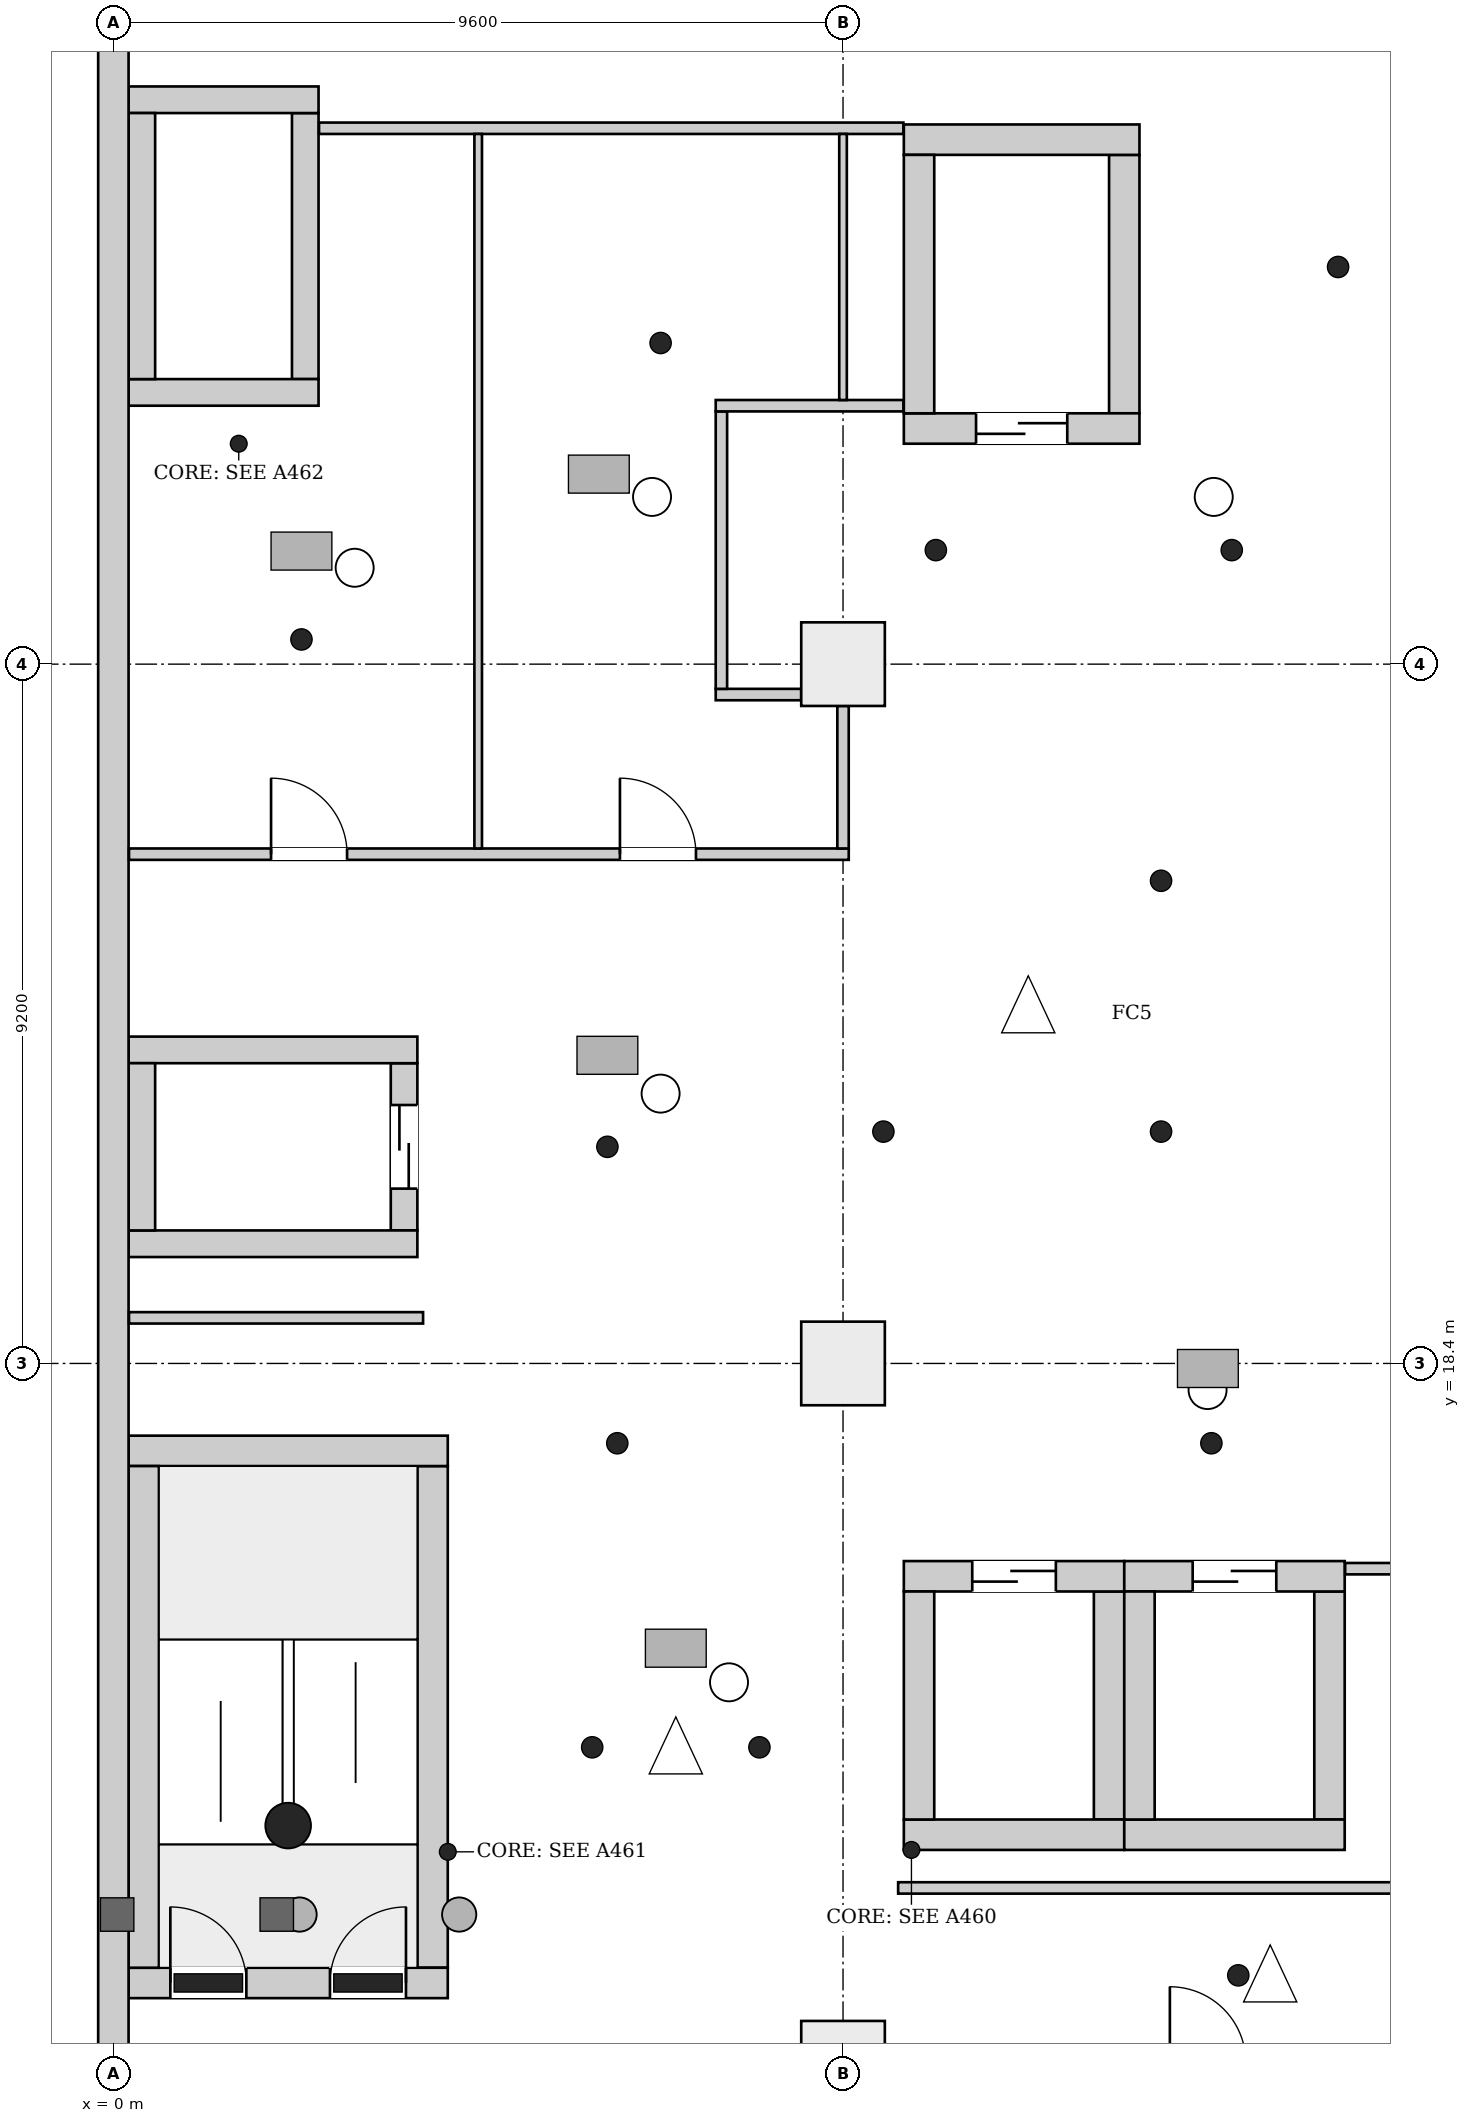
"""IFC4 building model, lengths in metres.
Left out: names, types, materials, properties, quantities, classifications, styles, units other than length and angle.
Written with IfcOpenShell. Run it as: python <this file> out.ifc"""

import sys

from ifc_helpers import new_model, si_unit, direction, frame, frame_2d, origin, origin_2d, place, context, subcontext, project, spatial, rectangle, extrude, element, fill, save


model = new_model("IFC4")
c1 = context("Model", 3, precision=1e-05, world=origin(), true_north=direction((0.0, 1.0)))
c2 = subcontext(c1, "Body", "Model", "MODEL_VIEW")
j1 = project(units=[si_unit("LENGTHUNIT", "METRE"), si_unit("PLANEANGLEUNIT", "RADIAN")], contexts=[c1])
p1 = place(None, origin())
s1 = spatial("IfcSite", under=j1, at=p1, CompositionType="ELEMENT")
p2 = place(p1, origin())
s2 = spatial("IfcBuilding", under=s1, at=p2, CompositionType="ELEMENT")
p3 = place(p2, frame((0.0, 0.0, 26.7)))
s3 = spatial("IfcBuildingStorey", under=s2, at=p3, CompositionType="ELEMENT", Elevation=26.7)
p4 = place(p3, frame((0.0, -0.2, 0.0), z_axis=(0.0, 0.0, 1.0), x_axis=(0.0, 1.0, 0.0)))
e1 = element("IfcWall", 1, at=p4, inside=s3, PredefinedType="SHEAR", context=c2, shape_type="SweptSolid", body=[
    extrude(rectangle(XDim=46.88, YDim=0.4, at=frame_2d((23.44, 0.0))), origin(), (0.0, 0.0, 1.0), 5.2),
])
p5 = place(p3, frame((0.2, 10.25, 0.0), z_axis=(0.0, 0.0, 1.0), x_axis=(1.0, 0.0, 0.0)))
e2 = element("IfcWall", 2, at=p5, inside=s3, PredefinedType="SHEAR", context=c2, shape_type="SweptSolid", body=[
    extrude(rectangle(XDim=4.2, YDim=0.4, at=frame_2d((2.1, 0.0))), origin(), (0.0, 0.0, 1.0), 5.2),
])
p6 = place(p5, frame((0.55, 0.0, 0.0)))
e3 = element("IfcOpeningElement", 3, at=p6, cuts=e2, PredefinedType="OPENING", context=c2, shape_type="SweptSolid", body=[
    extrude(rectangle(XDim=1.0, YDim=2.1, at=frame_2d((0.5, 1.05))), frame((0.0, 0.21, 0.0), z_axis=(0.0, -1.0, 0.0), x_axis=(1.0, 0.0, 0.0)), (0.0, 0.0, 1.0), 0.42),
])
p7 = place(p5, frame((2.65, 0.0, 0.0)))
e4 = element("IfcOpeningElement", 4, at=p7, cuts=e2, PredefinedType="OPENING", context=c2, shape_type="SweptSolid", body=[
    extrude(rectangle(XDim=1.0, YDim=2.1, at=frame_2d((0.5, 1.05))), frame((0.0, 0.21, 0.0), z_axis=(0.0, -1.0, 0.0), x_axis=(1.0, 0.0, 0.0)), (0.0, 0.0, 1.0), 0.42),
])
p8 = place(p3, frame((0.2, 17.25, 0.0), z_axis=(0.0, 0.0, 1.0), x_axis=(1.0, 0.0, 0.0)))
e5 = element("IfcWall", 5, at=p8, inside=s3, PredefinedType="SHEAR", context=c2, shape_type="SweptSolid", body=[
    extrude(rectangle(XDim=4.2, YDim=0.4, at=frame_2d((2.1, 0.0))), origin(), (0.0, 0.0, 1.0), 5.2),
])
for number, where, z_axis, x_axis in (
    (6, (0.4, 10.45, 0.0), (0.0, 0.0, 1.0), (0.0, 1.0, 0.0)),
    (7, (4.2, 10.45, 0.0), (0.0, 0.0, 1.0), (0.0, 1.0, 0.0)),
):
    element("IfcWall", number, at=place(p3, frame(where, z_axis=z_axis, x_axis=x_axis)), inside=s3, PredefinedType="SHEAR", context=c2, shape_type="SweptSolid", body=[
        extrude(rectangle(XDim=6.6, YDim=0.4, at=frame_2d((3.3, 0.0))), origin(), (0.0, 0.0, 1.0), 5.2),
    ])
for number, where, z_axis, x_axis in (
    (8, (0.2, 19.975, 0.0), (0.0, 0.0, 1.0), (1.0, 0.0, 0.0)),
    (9, (0.2, 22.525, 0.0), (0.0, 0.0, 1.0), (1.0, 0.0, 0.0)),
):
    element("IfcWall", number, at=place(p3, frame(where, z_axis=z_axis, x_axis=x_axis)), inside=s3, PredefinedType="SHEAR", context=c2, shape_type="SweptSolid", body=[
        extrude(rectangle(XDim=3.8, YDim=0.35, at=frame_2d((1.9, 0.0))), origin(), (0.0, 0.0, 1.0), 5.2),
    ])
p9 = place(p3, frame((0.375, 20.15, 0.0), z_axis=(0.0, 0.0, 1.0), x_axis=(0.0, 1.0, 0.0)))
e10 = element("IfcWall", 10, at=p9, inside=s3, PredefinedType="SHEAR", context=c2, shape_type="SweptSolid", body=[
    extrude(rectangle(XDim=2.2, YDim=0.35, at=frame_2d((1.1, 0.0))), origin(), (0.0, 0.0, 1.0), 5.2),
])
p10 = place(p3, frame((3.825, 20.15, 0.0), z_axis=(0.0, 0.0, 1.0), x_axis=(0.0, 1.0, 0.0)))
e11 = element("IfcWall", 11, at=p10, inside=s3, PredefinedType="SHEAR", context=c2, shape_type="SweptSolid", body=[
    extrude(rectangle(XDim=2.2, YDim=0.35, at=frame_2d((1.1, 0.0))), origin(), (0.0, 0.0, 1.0), 5.2),
])
p11 = place(p10, frame((0.55, 0.0, 0.0)))
e12 = element("IfcOpeningElement", 12, at=p11, cuts=e11, PredefinedType="OPENING", context=c2, shape_type="SweptSolid", body=[
    extrude(rectangle(XDim=1.1, YDim=2.1, at=frame_2d((0.55, 1.05))), frame((0.0, 0.185, 0.0), z_axis=(0.0, -1.0, 0.0), x_axis=(1.0, 0.0, 0.0)), (0.0, 0.0, 1.0), 0.37),
])
for number, where, z_axis, x_axis in (
    (13, (0.2, 31.175, 0.0), (0.0, 0.0, 1.0), (1.0, 0.0, 0.0)),
    (14, (0.2, 35.025, 0.0), (0.0, 0.0, 1.0), (1.0, 0.0, 0.0)),
):
    element("IfcWall", number, at=place(p3, frame(where, z_axis=z_axis, x_axis=x_axis)), inside=s3, PredefinedType="SHEAR", context=c2, shape_type="SweptSolid", body=[
        extrude(rectangle(XDim=2.5, YDim=0.35, at=frame_2d((1.25, 0.0))), origin(), (0.0, 0.0, 1.0), 5.2),
    ])
for number, where, z_axis, x_axis in (
    (15, (0.375, 31.35, 0.0), (0.0, 0.0, 1.0), (0.0, 1.0, 0.0)),
    (16, (2.525, 31.35, 0.0), (0.0, 0.0, 1.0), (0.0, 1.0, 0.0)),
):
    element("IfcWall", number, at=place(p3, frame(where, z_axis=z_axis, x_axis=x_axis)), inside=s3, PredefinedType="SHEAR", context=c2, shape_type="SweptSolid", body=[
        extrude(rectangle(XDim=3.5, YDim=0.35, at=frame_2d((1.75, 0.0))), origin(), (0.0, 0.0, 1.0), 5.2),
    ])
p12 = place(p3, frame((10.4, 12.2, 0.0), z_axis=(0.0, 0.0, 1.0), x_axis=(1.0, 0.0, 0.0)))
e17 = element("IfcWall", 17, at=p12, inside=s3, PredefinedType="SHEAR", context=c2, shape_type="SweptSolid", body=[
    extrude(rectangle(XDim=2.9, YDim=0.4, at=frame_2d((1.45, 0.0))), origin(), (0.0, 0.0, 1.0), 5.2),
])
p13 = place(p3, frame((10.4, 15.6, 0.0), z_axis=(0.0, 0.0, 1.0), x_axis=(1.0, 0.0, 0.0)))
e18 = element("IfcWall", 18, at=p13, inside=s3, PredefinedType="SHEAR", context=c2, shape_type="SweptSolid", body=[
    extrude(rectangle(XDim=2.9, YDim=0.4, at=frame_2d((1.45, 0.0))), origin(), (0.0, 0.0, 1.0), 5.2),
])
p14 = place(p13, frame((0.9, 0.0, 0.0)))
e19 = element("IfcOpeningElement", 19, at=p14, cuts=e18, PredefinedType="OPENING", context=c2, shape_type="SweptSolid", body=[
    extrude(rectangle(XDim=1.1, YDim=2.1, at=frame_2d((0.55, 1.05))), frame((0.0, 0.21, 0.0), z_axis=(0.0, -1.0, 0.0), x_axis=(1.0, 0.0, 0.0)), (0.0, 0.0, 1.0), 0.42),
])
for number, where, z_axis, x_axis in (
    (20, (10.6, 12.4, 0.0), (0.0, 0.0, 1.0), (0.0, 1.0, 0.0)),
    (21, (13.1, 12.4, 0.0), (0.0, 0.0, 1.0), (0.0, 1.0, 0.0)),
):
    element("IfcWall", number, at=place(p3, frame(where, z_axis=z_axis, x_axis=x_axis)), inside=s3, PredefinedType="SHEAR", context=c2, shape_type="SweptSolid", body=[
        extrude(rectangle(XDim=3.0, YDim=0.4, at=frame_2d((1.5, 0.0))), origin(), (0.0, 0.0, 1.0), 5.2),
    ])
p15 = place(p3, frame((13.3, 12.2, 0.0), z_axis=(0.0, 0.0, 1.0), x_axis=(1.0, 0.0, 0.0)))
e22 = element("IfcWall", 22, at=p15, inside=s3, PredefinedType="SHEAR", context=c2, shape_type="SweptSolid", body=[
    extrude(rectangle(XDim=2.9, YDim=0.4, at=frame_2d((1.45, 0.0))), origin(), (0.0, 0.0, 1.0), 5.2),
])
p16 = place(p3, frame((13.3, 15.6, 0.0), z_axis=(0.0, 0.0, 1.0), x_axis=(1.0, 0.0, 0.0)))
e23 = element("IfcWall", 23, at=p16, inside=s3, PredefinedType="SHEAR", context=c2, shape_type="SweptSolid", body=[
    extrude(rectangle(XDim=2.9, YDim=0.4, at=frame_2d((1.45, 0.0))), origin(), (0.0, 0.0, 1.0), 5.2),
])
p17 = place(p16, frame((0.9, 0.0, 0.0)))
e24 = element("IfcOpeningElement", 24, at=p17, cuts=e23, PredefinedType="OPENING", context=c2, shape_type="SweptSolid", body=[
    extrude(rectangle(XDim=1.1, YDim=2.1, at=frame_2d((0.55, 1.05))), frame((0.0, 0.21, 0.0), z_axis=(0.0, -1.0, 0.0), x_axis=(1.0, 0.0, 0.0)), (0.0, 0.0, 1.0), 0.42),
])
for number, where, z_axis, x_axis in (
    (25, (13.5, 12.4, 0.0), (0.0, 0.0, 1.0), (0.0, 1.0, 0.0)),
    (26, (16.0, 12.4, 0.0), (0.0, 0.0, 1.0), (0.0, 1.0, 0.0)),
):
    element("IfcWall", number, at=place(p3, frame(where, z_axis=z_axis, x_axis=x_axis)), inside=s3, PredefinedType="SHEAR", context=c2, shape_type="SweptSolid", body=[
        extrude(rectangle(XDim=3.0, YDim=0.4, at=frame_2d((1.5, 0.0))), origin(), (0.0, 0.0, 1.0), 5.2),
    ])
p18 = place(p3, frame((10.4, 30.7, 0.0), z_axis=(0.0, 0.0, 1.0), x_axis=(1.0, 0.0, 0.0)))
e27 = element("IfcWall", 27, at=p18, inside=s3, PredefinedType="SHEAR", context=c2, shape_type="SweptSolid", body=[
    extrude(rectangle(XDim=3.1, YDim=0.4, at=frame_2d((1.55, 0.0))), origin(), (0.0, 0.0, 1.0), 5.2),
])
p19 = place(p18, frame((0.95, 0.0, 0.0)))
e28 = element("IfcOpeningElement", 28, at=p19, cuts=e27, PredefinedType="OPENING", context=c2, shape_type="SweptSolid", body=[
    extrude(rectangle(XDim=1.2, YDim=2.1, at=frame_2d((0.6, 1.05))), frame((0.0, 0.21, 0.0), z_axis=(0.0, -1.0, 0.0), x_axis=(1.0, 0.0, 0.0)), (0.0, 0.0, 1.0), 0.42),
])
p20 = place(p3, frame((10.4, 34.5, 0.0), z_axis=(0.0, 0.0, 1.0), x_axis=(1.0, 0.0, 0.0)))
e29 = element("IfcWall", 29, at=p20, inside=s3, PredefinedType="SHEAR", context=c2, shape_type="SweptSolid", body=[
    extrude(rectangle(XDim=3.1, YDim=0.4, at=frame_2d((1.55, 0.0))), origin(), (0.0, 0.0, 1.0), 5.2),
])
for number, where, z_axis, x_axis in (
    (30, (10.6, 30.9, 0.0), (0.0, 0.0, 1.0), (0.0, 1.0, 0.0)),
    (31, (13.3, 30.9, 0.0), (0.0, 0.0, 1.0), (0.0, 1.0, 0.0)),
):
    element("IfcWall", number, at=place(p3, frame(where, z_axis=z_axis, x_axis=x_axis)), inside=s3, PredefinedType="SHEAR", context=c2, shape_type="SweptSolid", body=[
        extrude(rectangle(XDim=3.4, YDim=0.4, at=frame_2d((1.7, 0.0))), origin(), (0.0, 0.0, 1.0), 5.2),
    ])
for number, where, z_axis, x_axis in (
    (32, (9.6, 9.2, 0.0), (0.0, 0.0, 1.0), (1.0, 0.0, 0.0)),
    (33, (9.6, 18.4, 0.0), (0.0, 0.0, 1.0), (1.0, 0.0, 0.0)),
    (34, (9.6, 27.6, 0.0), (0.0, 0.0, 1.0), (1.0, 0.0, 0.0)),
):
    element("IfcColumn", number, at=place(p3, frame(where, z_axis=z_axis, x_axis=x_axis)), inside=s3, PredefinedType="COLUMN", context=c2, shape_type="SweptSolid", body=[
        extrude(rectangle(XDim=1.1, YDim=1.1, at=origin_2d()), origin(), (0.0, 0.0, 1.0), 5.2),
    ])
p21 = place(p3, frame((0.206, 19.0, 0.0), z_axis=(0.0, 0.0, 1.0), x_axis=(1.0, 0.0, 0.0)))
e35 = element("IfcWall", 35, at=p21, inside=s3, PredefinedType="PARTITIONING", context=c2, shape_type="SweptSolid", body=[
    extrude(rectangle(XDim=3.869, YDim=0.15, at=frame_2d((1.935, 0.0))), origin(), (0.0, 0.0, 1.0), 4.85),
])
p22 = place(p3, frame((0.206, 25.1, 0.0), z_axis=(0.0, 0.0, 1.0), x_axis=(1.0, 0.0, 0.0)))
e36 = element("IfcWall", 36, at=p22, inside=s3, PredefinedType="PARTITIONING", context=c2, shape_type="SweptSolid", body=[
    extrude(rectangle(XDim=9.469, YDim=0.15, at=frame_2d((4.734, 0.0))), origin(), (0.0, 0.0, 1.0), 4.85),
])
p23 = place(p22, frame((1.869, 0.0, 0.0)))
e37 = element("IfcOpeningElement", 37, at=p23, cuts=e36, PredefinedType="OPENING", context=c2, shape_type="SweptSolid", body=[
    extrude(rectangle(XDim=1.0, YDim=2.1, at=frame_2d((0.5, 1.05))), frame((0.0, 0.085, 0.0), z_axis=(0.0, -1.0, 0.0), x_axis=(1.0, 0.0, 0.0)), (0.0, 0.0, 1.0), 0.17),
])
p24 = place(p22, frame((6.459, 0.0, 0.0)))
e38 = element("IfcOpeningElement", 38, at=p24, cuts=e36, PredefinedType="OPENING", context=c2, shape_type="SweptSolid", body=[
    extrude(rectangle(XDim=1.0, YDim=2.1, at=frame_2d((0.5, 1.05))), frame((0.0, 0.085, 0.0), z_axis=(0.0, -1.0, 0.0), x_axis=(1.0, 0.0, 0.0)), (0.0, 0.0, 1.0), 0.17),
])
p25 = place(p3, frame((2.706, 34.65, 0.0), z_axis=(0.0, 0.0, 1.0), x_axis=(1.0, 0.0, 0.0)))
e39 = element("IfcWall", 39, at=p25, inside=s3, PredefinedType="PARTITIONING", context=c2, shape_type="SweptSolid", body=[
    extrude(rectangle(XDim=7.688, YDim=0.15, at=frame_2d((3.844, 0.0))), origin(), (0.0, 0.0, 1.0), 4.85),
])
p26 = place(p3, frame((4.8, 25.175, 0.0), z_axis=(0.0, 0.0, 1.0), x_axis=(0.0, 1.0, 0.0)))
e40 = element("IfcWall", 40, at=p26, inside=s3, PredefinedType="PARTITIONING", context=c2, shape_type="SweptSolid", body=[
    extrude(rectangle(XDim=9.4, YDim=0.1, at=frame_2d((4.7, 0.0))), origin(), (0.0, 0.0, 1.0), 4.85),
])
p27 = place(p3, frame((7.925, 27.2, 0.0), z_axis=(0.0, 0.0, 1.0), x_axis=(1.0, 0.0, 0.0)))
e41 = element("IfcWall", 41, at=p27, inside=s3, PredefinedType="PARTITIONING", context=c2, shape_type="SweptSolid", body=[
    extrude(rectangle(XDim=1.125, YDim=0.15, at=frame_2d((0.562, 0.0))), origin(), (0.0, 0.0, 1.0), 4.85),
])
p28 = place(p3, frame((8.0, 27.275, 0.0), z_axis=(0.0, 0.0, 1.0), x_axis=(0.0, 1.0, 0.0)))
e42 = element("IfcWall", 42, at=p28, inside=s3, PredefinedType="PARTITIONING", context=c2, shape_type="SweptSolid", body=[
    extrude(rectangle(XDim=3.65, YDim=0.15, at=frame_2d((1.825, 0.0))), origin(), (0.0, 0.0, 1.0), 4.85),
])
p29 = place(p3, frame((7.925, 31.0, 0.0), z_axis=(0.0, 0.0, 1.0), x_axis=(1.0, 0.0, 0.0)))
e43 = element("IfcWall", 43, at=p29, inside=s3, PredefinedType="PARTITIONING", context=c2, shape_type="SweptSolid", body=[
    extrude(rectangle(XDim=2.469, YDim=0.15, at=frame_2d((1.234, 0.0))), origin(), (0.0, 0.0, 1.0), 4.85),
])
p30 = place(p3, frame((9.6, 25.175, 0.0), z_axis=(0.0, 0.0, 1.0), x_axis=(0.0, 1.0, 0.0)))
e44 = element("IfcWall", 44, at=p30, inside=s3, PredefinedType="PARTITIONING", context=c2, shape_type="SweptSolid", body=[
    extrude(rectangle(XDim=1.875, YDim=0.15, at=frame_2d((0.938, 0.0))), origin(), (0.0, 0.0, 1.0), 4.45),
])
p31 = place(p3, frame((9.6, 31.075, 0.0), z_axis=(0.0, 0.0, 1.0), x_axis=(0.0, 1.0, 0.0)))
e45 = element("IfcWall", 45, at=p31, inside=s3, PredefinedType="PARTITIONING", context=c2, shape_type="SweptSolid", body=[
    extrude(rectangle(XDim=3.5, YDim=0.1, at=frame_2d((1.75, 0.0))), origin(), (0.0, 0.0, 1.0), 4.45),
])
p32 = place(p3, frame((10.325, 11.5, 0.0), z_axis=(0.0, 0.0, 1.0), x_axis=(1.0, 0.0, 0.0)))
e46 = element("IfcWall", 46, at=p32, inside=s3, PredefinedType="PARTITIONING", context=c2, shape_type="SweptSolid", body=[
    extrude(rectangle(XDim=9.569, YDim=0.15, at=frame_2d((4.785, 0.0))), origin(), (0.0, 0.0, 1.0), 4.85),
])
p33 = place(p3, frame((16.206, 15.7, 0.0), z_axis=(0.0, 0.0, 1.0), x_axis=(1.0, 0.0, 0.0)))
e47 = element("IfcWall", 47, at=p33, inside=s3, PredefinedType="PARTITIONING", context=c2, shape_type="SweptSolid", body=[
    extrude(rectangle(XDim=3.688, YDim=0.15, at=frame_2d((1.844, 0.0))), origin(), (0.0, 0.0, 1.0), 4.85),
])
p34 = place(p6, origin())
e48 = element("IfcDoor", 48, at=p34, inside=s3, OperationType="SINGLE_SWING_RIGHT", PredefinedType="DOOR", context=c2, shape_type="SweptSolid", body=[
    extrude(rectangle(XDim=1.0, YDim=2.1, at=frame_2d((0.5, 1.05))), frame((0.0, 0.025, 0.0), z_axis=(0.0, -1.0, 0.0), x_axis=(1.0, 0.0, 0.0)), (0.0, 0.0, 1.0), 0.05),
])
fill(e3, e48)
p35 = place(p7, origin())
e49 = element("IfcDoor", 49, at=p35, inside=s3, OperationType="SINGLE_SWING_LEFT", PredefinedType="DOOR", context=c2, shape_type="SweptSolid", body=[
    extrude(rectangle(XDim=1.0, YDim=2.1, at=frame_2d((0.5, 1.05))), frame((0.0, 0.025, 0.0), z_axis=(0.0, -1.0, 0.0), x_axis=(1.0, 0.0, 0.0)), (0.0, 0.0, 1.0), 0.05),
])
fill(e4, e49)
p36 = place(p11, origin())
e50 = element("IfcDoor", 50, at=p36, inside=s3, OperationType="DOUBLE_DOOR_SLIDING", PredefinedType="DOOR", context=c2, shape_type="SweptSolid", body=[
    extrude(rectangle(XDim=1.1, YDim=2.1, at=frame_2d((0.55, 1.05))), frame((0.0, 0.025, 0.0), z_axis=(0.0, -1.0, 0.0), x_axis=(1.0, 0.0, 0.0)), (0.0, 0.0, 1.0), 0.05),
])
fill(e12, e50)
p37 = place(p14, origin())
e51 = element("IfcDoor", 51, at=p37, inside=s3, OperationType="DOUBLE_DOOR_SLIDING", PredefinedType="DOOR", context=c2, shape_type="SweptSolid", body=[
    extrude(rectangle(XDim=1.1, YDim=2.1, at=frame_2d((0.55, 1.05))), frame((0.0, 0.025, 0.0), z_axis=(0.0, -1.0, 0.0), x_axis=(1.0, 0.0, 0.0)), (0.0, 0.0, 1.0), 0.05),
])
fill(e19, e51)
p38 = place(p17, origin())
e52 = element("IfcDoor", 52, at=p38, inside=s3, OperationType="DOUBLE_DOOR_SLIDING", PredefinedType="DOOR", context=c2, shape_type="SweptSolid", body=[
    extrude(rectangle(XDim=1.1, YDim=2.1, at=frame_2d((0.55, 1.05))), frame((0.0, 0.025, 0.0), z_axis=(0.0, -1.0, 0.0), x_axis=(1.0, 0.0, 0.0)), (0.0, 0.0, 1.0), 0.05),
])
fill(e24, e52)
p39 = place(p19, origin())
e53 = element("IfcDoor", 53, at=p39, inside=s3, OperationType="DOUBLE_DOOR_SLIDING", PredefinedType="DOOR", context=c2, shape_type="SweptSolid", body=[
    extrude(rectangle(XDim=1.2, YDim=2.1, at=frame_2d((0.6, 1.05))), frame((0.0, 0.025, 0.0), z_axis=(0.0, -1.0, 0.0), x_axis=(1.0, 0.0, 0.0)), (0.0, 0.0, 1.0), 0.05),
])
fill(e28, e53)
p40 = place(p23, origin())
e54 = element("IfcDoor", 54, at=p40, inside=s3, OperationType="SINGLE_SWING_LEFT", PredefinedType="DOOR", context=c2, shape_type="SweptSolid", body=[
    extrude(rectangle(XDim=1.0, YDim=2.1, at=frame_2d((0.5, 1.05))), frame((0.0, 0.025, 0.0), z_axis=(0.0, -1.0, 0.0), x_axis=(1.0, 0.0, 0.0)), (0.0, 0.0, 1.0), 0.05),
])
fill(e37, e54)
p41 = place(p24, origin())
e55 = element("IfcDoor", 55, at=p41, inside=s3, OperationType="SINGLE_SWING_RIGHT", PredefinedType="DOOR", context=c2, shape_type="SweptSolid", body=[
    extrude(rectangle(XDim=1.0, YDim=2.1, at=frame_2d((0.5, 1.05))), frame((0.0, 0.025, 0.0), z_axis=(0.0, -1.0, 0.0), x_axis=(1.0, 0.0, 0.0)), (0.0, 0.0, 1.0), 0.05),
])
fill(e38, e55)
save(model, sys.argv[1])
